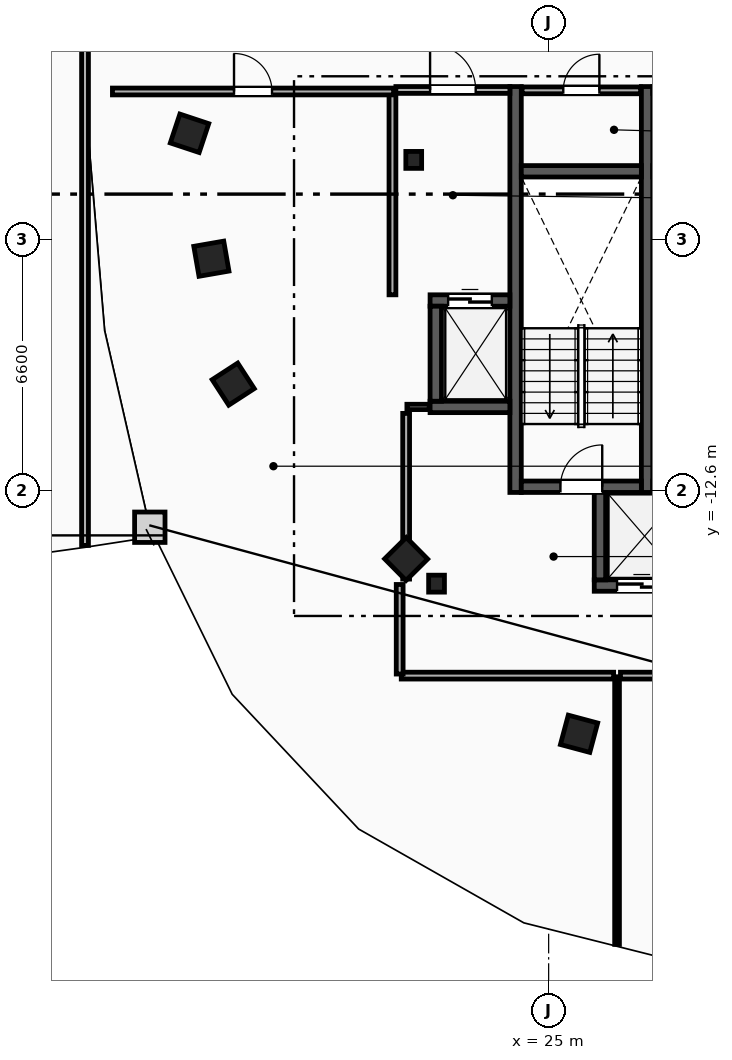
"""IFC4 building model, lengths in metres.
Left out: names, types, materials, properties, quantities, classifications, styles, units other than length and angle.
Written with IfcOpenShell. Run it as: python <this file> out.ifc"""

import sys

from ifc_helpers import new_model, si_unit, direction, frame, frame_2d, origin, origin_2d, place, context, subcontext, project, spatial, rectangle, i_section, extrude, element, fill, save


model = new_model("IFC4")
c1 = context("Model", 3, precision=1e-05, world=origin(), true_north=direction((0.0, 1.0)))
c2 = subcontext(c1, "Body", "Model", "MODEL_VIEW")
j1 = project(units=[si_unit("LENGTHUNIT", "METRE"), si_unit("PLANEANGLEUNIT", "RADIAN")], contexts=[c1])
p1 = place(None, origin())
s1 = spatial("IfcSite", under=j1, at=p1, CompositionType="ELEMENT")
p2 = place(p1, origin())
s2 = spatial("IfcBuilding", under=s1, at=p2, CompositionType="ELEMENT")
p3 = place(p2, frame((0.0, 0.0, 239.6)))
s3 = spatial("IfcBuildingStorey", under=s2, at=p3, CompositionType="ELEMENT", Elevation=239.6)
for number, where, z_axis, x_axis in (
    (1, (21.45, -3.9, 0.0), (0.0, 0.0, 1.0), (1.0, 0.0, 0.0)),
    (2, (22.05, -15.05, 0.0), (0.0, 0.0, 1.0), (1.0, 0.0, 0.0)),
):
    element("IfcColumn", number, at=place(p3, frame(where, z_axis=z_axis, x_axis=x_axis)), inside=s3, PredefinedType="COLUMN", context=c2, shape_type="SweptSolid", body=[
        extrude(i_section(OverallWidth=0.416, OverallDepth=0.446, WebThickness=0.039, FlangeThickness=0.063, FilletRadius=0.018, at=origin_2d()), origin(), (0.0, 0.0, 1.0), 3.6),
    ])
for number, where, z_axis, x_axis in (
    (3, (15.55, -3.2, 0.0), (0.0, 0.0, 1.0), (-0.315, -0.949, 0.0)),
    (4, (16.125, -6.5, 0.0), (0.0, 0.0, 1.0), (0.172, -0.985, 0.0)),
    (5, (16.7, -9.8, 0.0), (0.0, 0.0, 1.0), (0.544, -0.839, 0.0)),
    (6, (21.25, -14.4, 0.0), (0.0, 0.0, 1.0), (0.703, -0.711, 0.0)),
    (7, (25.8, -19.0, 0.0), (0.0, 0.0, 1.0), (0.966, -0.259, 0.0)),
):
    element("IfcColumn", number, at=place(p3, frame(where, z_axis=z_axis, x_axis=x_axis)), inside=s3, PredefinedType="COLUMN", context=c2, shape_type="SweptSolid", body=[
        extrude(rectangle(XDim=0.8, YDim=0.8, at=origin_2d()), origin(), (0.0, 0.0, 1.0), 3.6),
    ])
for number, where, z_axis, x_axis in (
    (8, (27.59, -12.65, 0.0), (0.0, 0.0, 1.0), (0.0, 1.0, 0.0)),
    (9, (24.13, -12.65, 0.0), (0.0, 0.0, 1.0), (0.0, 1.0, 0.0)),
):
    element("IfcWall", number, at=place(p3, frame(where, z_axis=z_axis, x_axis=x_axis)), inside=s3, PredefinedType="SHEAR", context=c2, shape_type="SweptSolid", body=[
        extrude(rectangle(XDim=10.68, YDim=0.3, at=frame_2d((5.34, 0.0))), origin(), (0.0, 0.0, 1.0), 3.34),
    ])
p4 = place(p3, frame((24.28, -12.5, 0.0), z_axis=(0.0, 0.0, 1.0), x_axis=(1.0, 0.0, 0.0)))
e10 = element("IfcWall", 10, at=p4, inside=s3, PredefinedType="SHEAR", context=c2, shape_type="SweptSolid", body=[
    extrude(rectangle(XDim=3.16, YDim=0.3, at=frame_2d((1.58, 0.0))), origin(), (0.0, 0.0, 1.0), 3.34),
])
p5 = place(p4, frame((1.03, 0.0, 0.0)))
e11 = element("IfcOpeningElement", 11, at=p5, cuts=e10, PredefinedType="OPENING", context=c2, shape_type="SweptSolid", body=[
    extrude(rectangle(XDim=1.1, YDim=2.15, at=frame_2d((0.55, 1.075))), frame((0.0, 0.16, 0.0), z_axis=(0.0, -1.0, 0.0), x_axis=(1.0, 0.0, 0.0)), (0.0, 0.0, 1.0), 0.32),
])
p6 = place(p3, frame((24.28, -4.2, 0.0), z_axis=(0.0, 0.0, 1.0), x_axis=(1.0, 0.0, 0.0)))
e12 = element("IfcWall", 12, at=p6, inside=s3, PredefinedType="SHEAR", context=c2, shape_type="SweptSolid", body=[
    extrude(rectangle(XDim=3.16, YDim=0.3, at=frame_2d((1.58, 0.0))), origin(), (0.0, 0.0, 1.0), 3.34),
])
p7 = place(p3, frame((20.89, -7.45, 0.0), z_axis=(0.0, 0.0, 1.0), x_axis=(0.0, 1.0, 0.0)))
e13 = element("IfcWall", 13, at=p7, inside=s3, PredefinedType="PARTITIONING", context=c2, shape_type="SweptSolid", body=[
    extrude(rectangle(XDim=5.3, YDim=0.18, at=frame_2d((2.65, 0.0))), origin(), (0.0, 0.0, 1.0), 3.34),
])
p8 = place(p3, frame((20.98, -2.06, 0.0), z_axis=(0.0, 0.0, 1.0), x_axis=(1.0, 0.0, 0.0)))
e14 = element("IfcWall", 14, at=p8, inside=s3, PredefinedType="PARTITIONING", context=c2, shape_type="SweptSolid", body=[
    extrude(rectangle(XDim=3.0, YDim=0.18, at=frame_2d((1.5, 0.0))), origin(), (0.0, 0.0, 1.0), 3.34),
])
p9 = place(p8, frame((0.9, 0.0, 0.0)))
e15 = element("IfcOpeningElement", 15, at=p9, cuts=e14, PredefinedType="OPENING", context=c2, shape_type="SweptSolid", body=[
    extrude(rectangle(XDim=1.2, YDim=2.15, at=frame_2d((0.6, 1.075))), frame((0.0, 0.1, 0.0), z_axis=(0.0, -1.0, 0.0), x_axis=(1.0, 0.0, 0.0)), (0.0, 0.0, 1.0), 0.2),
])
p10 = place(p3, frame((21.88, -7.6, 0.0), z_axis=(0.0, 0.0, 1.0), x_axis=(1.0, 0.0, 0.0)))
e16 = element("IfcWall", 16, at=p10, inside=s3, PredefinedType="SHEAR", context=c2, shape_type="SweptSolid", body=[
    extrude(rectangle(XDim=2.1, YDim=0.3, at=frame_2d((1.05, 0.0))), origin(), (0.0, 0.0, 1.0), 3.34),
])
p11 = place(p10, frame((0.475, 0.0, 0.0)))
e17 = element("IfcOpeningElement", 17, at=p11, cuts=e16, PredefinedType="OPENING", context=c2, shape_type="SweptSolid", body=[
    extrude(rectangle(XDim=1.15, YDim=2.2, at=frame_2d((0.575, 1.1))), frame((0.0, 0.16, 0.0), z_axis=(0.0, -1.0, 0.0), x_axis=(1.0, 0.0, 0.0)), (0.0, 0.0, 1.0), 0.32),
])
p12 = place(p3, frame((21.88, -10.4, 0.0), z_axis=(0.0, 0.0, 1.0), x_axis=(1.0, 0.0, 0.0)))
e18 = element("IfcWall", 18, at=p12, inside=s3, PredefinedType="SHEAR", context=c2, shape_type="SweptSolid", body=[
    extrude(rectangle(XDim=2.1, YDim=0.3, at=frame_2d((1.05, 0.0))), origin(), (0.0, 0.0, 1.0), 3.34),
])
p13 = place(p3, frame((22.03, -10.25, 0.0), z_axis=(0.0, 0.0, 1.0), x_axis=(0.0, 1.0, 0.0)))
e19 = element("IfcWall", 19, at=p13, inside=s3, PredefinedType="SHEAR", context=c2, shape_type="SweptSolid", body=[
    extrude(rectangle(XDim=2.5, YDim=0.3, at=frame_2d((1.25, 0.0))), origin(), (0.0, 0.0, 1.0), 3.34),
])
p14 = place(p3, frame((26.2, -15.1, 0.0), z_axis=(0.0, 0.0, 1.0), x_axis=(1.0, 0.0, 0.0)))
e20 = element("IfcWall", 20, at=p14, inside=s3, PredefinedType="SHEAR", context=c2, shape_type="SweptSolid", body=[
    extrude(rectangle(XDim=2.5, YDim=0.3, at=frame_2d((1.25, 0.0))), origin(), (0.0, 0.0, 1.0), 3.34),
])
p15 = place(p14, frame((0.6, 0.0, 0.0)))
e21 = element("IfcOpeningElement", 21, at=p15, cuts=e20, PredefinedType="OPENING", context=c2, shape_type="SweptSolid", body=[
    extrude(rectangle(XDim=1.3, YDim=2.2, at=frame_2d((0.65, 1.1))), frame((0.0, 0.16, 0.0), z_axis=(0.0, -1.0, 0.0), x_axis=(1.0, 0.0, 0.0)), (0.0, 0.0, 1.0), 0.32),
])
p16 = place(p3, frame((26.35, -14.95, 0.0), z_axis=(0.0, 0.0, 1.0), x_axis=(0.0, 1.0, 0.0)))
e22 = element("IfcWall", 22, at=p16, inside=s3, PredefinedType="SHEAR", context=c2, shape_type="SweptSolid", body=[
    extrude(rectangle(XDim=2.3, YDim=0.3, at=frame_2d((1.15, 0.0))), origin(), (0.0, 0.0, 1.0), 3.34),
])
p17 = place(p3, frame((21.27, -10.4, 0.0), z_axis=(0.0, 0.0, 1.0), x_axis=(1.0, 0.0, 0.0)))
e23 = element("IfcWall", 23, at=p17, inside=s3, PredefinedType="PARTITIONING", context=c2, shape_type="SweptSolid", body=[
    extrude(rectangle(XDim=0.59, YDim=0.14, at=frame_2d((0.295, 0.0))), origin(), (0.0, 0.0, 1.0), 3.34),
])
p18 = place(p3, frame((21.25, -14.93, 0.0), z_axis=(0.0, 0.0, 1.0), x_axis=(0.0, 1.0, 0.0)))
e24 = element("IfcWall", 24, at=p18, inside=s3, PredefinedType="PARTITIONING", context=c2, shape_type="SweptSolid", body=[
    extrude(rectangle(XDim=4.36, YDim=0.18, at=frame_2d((2.18, 0.0))), origin(), (0.0, 0.0, 1.0), 3.34),
])
p19 = place(p3, frame((24.3, -2.07, 0.0), z_axis=(0.0, 0.0, 1.0), x_axis=(1.0, 0.0, 0.0)))
e25 = element("IfcWall", 25, at=p19, inside=s3, PredefinedType="PARTITIONING", context=c2, shape_type="SweptSolid", body=[
    extrude(rectangle(XDim=3.12, YDim=0.18, at=frame_2d((1.56, 0.0))), origin(), (0.0, 0.0, 1.0), 3.34),
])
p20 = place(p19, frame((1.085, 0.0, 0.0)))
e26 = element("IfcOpeningElement", 26, at=p20, cuts=e25, PredefinedType="OPENING", context=c2, shape_type="SweptSolid", body=[
    extrude(rectangle(XDim=0.95, YDim=2.1, at=frame_2d((0.475, 1.05))), frame((0.0, 0.1, 0.0), z_axis=(0.0, -1.0, 0.0), x_axis=(1.0, 0.0, 0.0)), (0.0, 0.0, 1.0), 0.2),
])
p21 = place(p3, frame((26.8, -24.542, 0.0), z_axis=(0.0, 0.0, 1.0), x_axis=(0.0, 1.0, 0.0)))
e27 = element("IfcWall", 27, at=p21, inside=s3, PredefinedType="PARTITIONING", context=c2, shape_type="SweptSolid", body=[
    extrude(rectangle(XDim=7.042, YDim=0.125, at=frame_2d((3.521, 0.0))), origin(), (0.0, 0.0, 1.0), 3.34),
])
p22 = place(p3, frame((26.89, -17.47, 0.0), z_axis=(0.0, 0.0, 1.0), x_axis=(1.0, 0.0, 0.0)))
e28 = element("IfcWall", 28, at=p22, inside=s3, PredefinedType="PARTITIONING", context=c2, shape_type="SweptSolid", body=[
    extrude(rectangle(XDim=6.739, YDim=0.18, at=frame_2d((3.369, 0.0))), origin(), (0.0, 0.0, 1.0), 3.34),
])
p23 = place(p22, frame((2.869, 0.0, 0.0)))
e29 = element("IfcOpeningElement", 29, at=p23, cuts=e28, PredefinedType="OPENING", context=c2, shape_type="SweptSolid", body=[
    extrude(rectangle(XDim=1.0, YDim=2.15, at=frame_2d((0.5, 1.075))), frame((0.0, 0.1, 0.0), z_axis=(0.0, -1.0, 0.0), x_axis=(1.0, 0.0, 0.0)), (0.0, 0.0, 1.0), 0.2),
])
p24 = place(p3, frame((13.521, -2.1, 0.0), z_axis=(0.0, 0.0, 1.0), x_axis=(1.0, 0.0, 0.0)))
e30 = element("IfcWall", 30, at=p24, inside=s3, PredefinedType="PARTITIONING", context=c2, shape_type="SweptSolid", body=[
    extrude(rectangle(XDim=7.398, YDim=0.18, at=frame_2d((3.699, 0.0))), origin(), (0.0, 0.0, 1.0), 3.34),
])
p25 = place(p24, frame((3.199, 0.0, 0.0)))
e31 = element("IfcOpeningElement", 31, at=p25, cuts=e30, PredefinedType="OPENING", context=c2, shape_type="SweptSolid", body=[
    extrude(rectangle(XDim=1.0, YDim=2.15, at=frame_2d((0.5, 1.075))), frame((0.0, 0.1, 0.0), z_axis=(0.0, -1.0, 0.0), x_axis=(1.0, 0.0, 0.0)), (0.0, 0.0, 1.0), 0.2),
])
p26 = place(p3, frame((21.122, -17.47, 0.0), z_axis=(0.0, 0.0, 1.0), x_axis=(1.0, 0.0, 0.0)))
e32 = element("IfcWall", 32, at=p26, inside=s3, PredefinedType="PARTITIONING", context=c2, shape_type="SweptSolid", body=[
    extrude(rectangle(XDim=5.588, YDim=0.18, at=frame_2d((2.794, 0.0))), origin(), (0.0, 0.0, 1.0), 3.34),
])
p27 = place(p3, frame((21.08, -15.072, 0.0), z_axis=(0.0, 0.0, 1.0), x_axis=(0.0, -1.0, 0.0)))
e33 = element("IfcWall", 33, at=p27, inside=s3, PredefinedType="PARTITIONING", context=c2, shape_type="SweptSolid", body=[
    extrude(rectangle(XDim=2.357, YDim=0.18, at=frame_2d((1.178, 0.0))), origin(), (0.0, 0.0, 1.0), 3.34),
])
p28 = place(p3, frame((12.8, -14.044, 0.0), z_axis=(0.0, 0.0, 1.0), x_axis=(0.0, 1.0, 0.0)))
e34 = element("IfcWall", 34, at=p28, inside=s3, PredefinedType="PARTITIONING", context=c2, shape_type="SweptSolid", body=[
    extrude(rectangle(XDim=15.204, YDim=0.18, at=frame_2d((7.602, 0.0))), origin(), (0.0, 0.0, 1.0), 3.34),
])
p29 = place(p5, origin())
e35 = element("IfcDoor", 35, at=p29, inside=s3, OperationType="SINGLE_SWING_RIGHT", PredefinedType="DOOR", context=c2, shape_type="SweptSolid", body=[
    extrude(rectangle(XDim=1.1, YDim=2.15, at=frame_2d((0.55, 1.075))), frame((0.0, 0.025, 0.0), z_axis=(0.0, -1.0, 0.0), x_axis=(1.0, 0.0, 0.0)), (0.0, 0.0, 1.0), 0.05),
])
fill(e11, e35)
p30 = place(p9, origin())
e36 = element("IfcDoor", 36, at=p30, inside=s3, OperationType="SINGLE_SWING_LEFT", PredefinedType="DOOR", context=c2, shape_type="SweptSolid", body=[
    extrude(rectangle(XDim=1.2, YDim=2.15, at=frame_2d((0.6, 1.075))), frame((0.0, 0.025, 0.0), z_axis=(0.0, -1.0, 0.0), x_axis=(1.0, 0.0, 0.0)), (0.0, 0.0, 1.0), 0.05),
])
fill(e15, e36)
p31 = place(p11, origin())
e37 = element("IfcDoor", 37, at=p31, inside=s3, OperationType="SLIDING_TO_LEFT", PredefinedType="TRAPDOOR", context=c2, shape_type="SweptSolid", body=[
    extrude(rectangle(XDim=1.15, YDim=2.2, at=frame_2d((0.575, 1.1))), frame((0.0, 0.025, 0.0), z_axis=(0.0, -1.0, 0.0), x_axis=(1.0, 0.0, 0.0)), (0.0, 0.0, 1.0), 0.05),
])
fill(e17, e37)
p32 = place(p15, origin())
e38 = element("IfcDoor", 38, at=p32, inside=s3, OperationType="SLIDING_TO_LEFT", PredefinedType="TRAPDOOR", context=c2, shape_type="SweptSolid", body=[
    extrude(rectangle(XDim=1.3, YDim=2.2, at=frame_2d((0.65, 1.1))), frame((0.0, 0.025, 0.0), z_axis=(0.0, -1.0, 0.0), x_axis=(1.0, 0.0, 0.0)), (0.0, 0.0, 1.0), 0.05),
])
fill(e21, e38)
p33 = place(p25, origin())
e39 = element("IfcDoor", 39, at=p33, inside=s3, OperationType="SINGLE_SWING_LEFT", PredefinedType="DOOR", context=c2, shape_type="SweptSolid", body=[
    extrude(rectangle(XDim=1.0, YDim=2.15, at=frame_2d((0.5, 1.075))), frame((0.0, 0.025, 0.0), z_axis=(0.0, -1.0, 0.0), x_axis=(1.0, 0.0, 0.0)), (0.0, 0.0, 1.0), 0.05),
])
fill(e31, e39)
p34 = place(p20, origin())
e40 = element("IfcDoor", 40, at=p34, inside=s3, OperationType="SINGLE_SWING_RIGHT", PredefinedType="DOOR", context=c2, shape_type="SweptSolid", body=[
    extrude(rectangle(XDim=0.95, YDim=2.1, at=frame_2d((0.475, 1.05))), frame((0.0, 0.025, 0.0), z_axis=(0.0, -1.0, 0.0), x_axis=(1.0, 0.0, 0.0)), (0.0, 0.0, 1.0), 0.05),
])
fill(e26, e40)
save(model, sys.argv[1])
